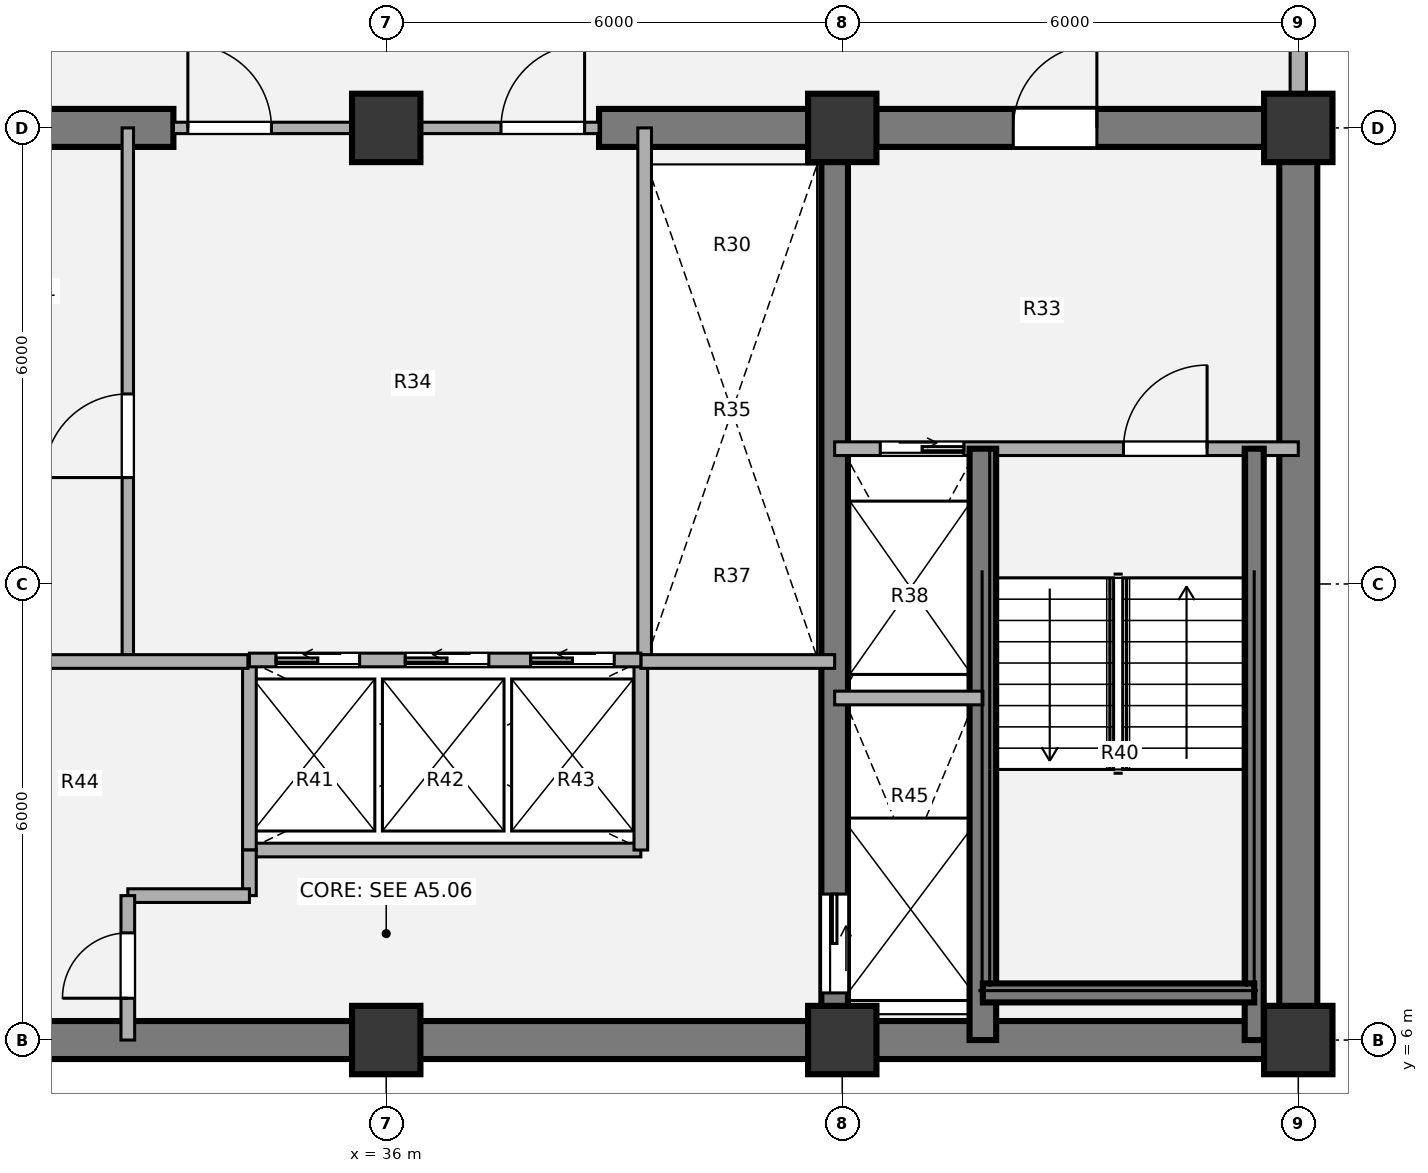
"""IFC4 building model, lengths in metres.
Left out: names, types, materials, properties, quantities, classifications, styles, units other than length and angle.
Written with IfcOpenShell. Run it as: python <this file> out.ifc"""

import sys

from ifc_helpers import new_model, si_unit, direction, frame, frame_2d, origin, origin_2d, place, context, subcontext, project, spatial, rectangle, extrude, source, transform, mapped, element, fill, save


model = new_model("IFC4")
c1 = context("Model", 3, precision=1e-05, world=origin(), true_north=direction((0.0, 1.0)))
c2 = subcontext(c1, "Body", "Model", "MODEL_VIEW")
j1 = project(units=[si_unit("LENGTHUNIT", "METRE"), si_unit("PLANEANGLEUNIT", "RADIAN")], contexts=[c1])
p1 = place(None, origin())
s1 = spatial("IfcSite", under=j1, at=p1, CompositionType="ELEMENT")
p2 = place(p1, origin())
s2 = spatial("IfcBuilding", under=s1, at=p2, CompositionType="ELEMENT")
p3 = place(p2, frame((0.0, 0.0, 127.62)))
s3 = spatial("IfcBuildingStorey", under=s2, at=p3, CompositionType="ELEMENT", Elevation=127.62)
m1 = source(origin(), c2, "Body", "SweptSolid", [
    extrude(rectangle(XDim=0.9, YDim=0.9, at=origin_2d()), origin(), (0.0, 0.0, 1.0), 3.78),
])
for number, where, z_axis, x_axis in (
    (1, (36.0, 6.0, 0.0), (0.0, 0.0, 1.0), (1.0, 0.0, 0.0)),
    (2, (42.0, 6.0, 0.0), (0.0, 0.0, 1.0), (1.0, 0.0, 0.0)),
    (3, (48.0, 6.0, 0.0), (0.0, 0.0, 1.0), (1.0, 0.0, 0.0)),
    (4, (36.0, 18.0, 0.0), (0.0, 0.0, 1.0), (1.0, 0.0, 0.0)),
    (5, (42.0, 18.0, 0.0), (0.0, 0.0, 1.0), (1.0, 0.0, 0.0)),
    (6, (48.0, 18.0, 0.0), (0.0, 0.0, 1.0), (1.0, 0.0, 0.0)),
):
    element("IfcColumn", number, at=place(p3, frame(where, z_axis=z_axis, x_axis=x_axis)), inside=s3, PredefinedType="COLUMN", context=c2, shape_type="MappedRepresentation", body=[
        mapped(m1, transform((0.0, 0.0, 0.0), x_axis=(1.0, 0.0, 0.0), y_axis=(0.0, 1.0, 0.0), z_axis=(0.0, 0.0, 1.0), scale=1.0)),
    ])
p4 = place(p3, frame((48.25, 6.0, 0.0), z_axis=(0.0, 0.0, 1.0), x_axis=(-1.0, 0.0, 0.0)))
e7 = element("IfcWall", 7, at=p4, inside=s3, PredefinedType="SHEAR", context=c2, shape_type="SweptSolid", body=[
    extrude(rectangle(XDim=24.5, YDim=0.5, at=frame_2d((12.25, 0.0))), origin(), (0.0, 0.0, 1.0), 3.78),
])
p5 = place(p3, frame((48.0, 18.0, 0.0), z_axis=(0.0, 0.0, 1.0), x_axis=(0.0, -1.0, 0.0)))
e8 = element("IfcWall", 8, at=p5, inside=s3, PredefinedType="SHEAR", context=c2, shape_type="SweptSolid", body=[
    extrude(rectangle(XDim=12.0, YDim=0.5, at=frame_2d((6.0, 0.0))), origin(), (0.0, 0.0, 1.0), 3.78),
])
p6 = place(p3, frame((23.75, 18.0, 0.0), z_axis=(0.0, 0.0, 1.0), x_axis=(1.0, 0.0, 0.0)))
e9 = element("IfcWall", 9, at=p6, inside=s3, PredefinedType="SHEAR", context=c2, shape_type="SweptSolid", body=[
    extrude(rectangle(XDim=9.45, YDim=0.5, at=frame_2d((4.725, 0.0))), origin(), (0.0, 0.0, 1.0), 3.78),
])
p7 = place(p6, frame((2.95, 0.0, 0.0)))
e10 = element("IfcOpeningElement", 10, at=p7, cuts=e9, PredefinedType="OPENING", context=c2, shape_type="SweptSolid", body=[
    extrude(rectangle(XDim=1.1, YDim=2.1, at=origin_2d()), frame((0.55, 0.26, 1.05), z_axis=(0.0, -1.0, 0.0), x_axis=(1.0, 0.0, 0.0)), (0.0, 0.0, 1.0), 0.52),
])
p8 = place(p3, frame((38.8, 18.0, 0.0), z_axis=(0.0, 0.0, 1.0), x_axis=(1.0, 0.0, 0.0)))
e11 = element("IfcWall", 11, at=p8, inside=s3, PredefinedType="SHEAR", context=c2, shape_type="SweptSolid", body=[
    extrude(rectangle(XDim=9.45, YDim=0.5, at=frame_2d((4.725, 0.0))), origin(), (0.0, 0.0, 1.0), 3.78),
])
p9 = place(p8, frame((5.45, 0.0, 0.0)))
e12 = element("IfcOpeningElement", 12, at=p9, cuts=e11, PredefinedType="OPENING", context=c2, shape_type="SweptSolid", body=[
    extrude(rectangle(XDim=1.1, YDim=2.1, at=origin_2d()), frame((0.55, 0.26, 1.05), z_axis=(0.0, -1.0, 0.0), x_axis=(1.0, 0.0, 0.0)), (0.0, 0.0, 1.0), 0.52),
])
p10 = place(p3, frame((41.9, 18.0, 0.0), z_axis=(0.0, 0.0, 1.0), x_axis=(0.0, -1.0, 0.0)))
e13 = element("IfcWall", 13, at=p10, inside=s3, PredefinedType="SHEAR", context=c2, shape_type="SweptSolid", body=[
    extrude(rectangle(XDim=12.0, YDim=0.35, at=frame_2d((6.0, 0.0))), origin(), (0.0, 0.0, 1.0), 3.78),
])
p11 = place(p10, frame((10.08, 0.0, 0.0)))
e14 = element("IfcOpeningElement", 14, at=p11, cuts=e13, PredefinedType="OPENING", context=c2, shape_type="SweptSolid", body=[
    extrude(rectangle(XDim=1.3, YDim=2.1, at=origin_2d()), frame((0.65, 0.185, 1.05), z_axis=(0.0, -1.0, 0.0), x_axis=(1.0, 0.0, 0.0)), (0.0, 0.0, 1.0), 0.37),
])
p12 = place(p3, frame((48.0, 21.05, 0.0), z_axis=(0.0, 0.0, 1.0), x_axis=(0.0, -1.0, 0.0)))
e15 = element("IfcWall", 15, at=p12, inside=s3, PredefinedType="SOLIDWALL", context=c2, shape_type="SweptSolid", body=[
    extrude(rectangle(XDim=2.62, YDim=0.215, at=frame_2d((1.31, 0.0))), origin(), (0.0, 0.0, 1.0), 3.53),
])
p13 = place(p3, frame((32.6, 11.0, 0.0), z_axis=(0.0, 0.0, 1.0), x_axis=(0.0, 1.0, 0.0)))
e16 = element("IfcWall", 16, at=p13, inside=s3, PredefinedType="PARTITIONING", context=c2, shape_type="SweptSolid", body=[
    extrude(rectangle(XDim=7.0, YDim=0.15, at=frame_2d((3.5, 0.0))), origin(), (0.0, 0.0, 1.0), 3.5),
])
p14 = place(p13, frame((2.4, 0.0, 0.0)))
e17 = element("IfcOpeningElement", 17, at=p14, cuts=e16, PredefinedType="OPENING", context=c2, shape_type="SweptSolid", body=[
    extrude(rectangle(XDim=1.1, YDim=2.1, at=origin_2d()), frame((0.55, 0.085, 1.05), z_axis=(0.0, -1.0, 0.0), x_axis=(1.0, 0.0, 0.0)), (0.0, 0.0, 1.0), 0.17),
])
p15 = place(p3, frame((34.2, 8.5, 0.0), z_axis=(0.0, 0.0, 1.0), x_axis=(1.0, 0.0, 0.0)))
e18 = element("IfcWall", 18, at=p15, inside=s3, PredefinedType="PARTITIONING", context=c2, shape_type="SweptSolid", body=[
    extrude(rectangle(XDim=5.15, YDim=0.18, at=frame_2d((2.575, 0.0))), origin(), (0.0, 0.0, 1.0), 3.5),
])
for number, where, z_axis, x_axis in (
    (19, (34.2, 8.5, 0.0), (0.0, 0.0, 1.0), (0.0, 1.0, 0.0)),
    (20, (39.35, 8.5, 0.0), (0.0, 0.0, 1.0), (0.0, 1.0, 0.0)),
):
    element("IfcWall", number, at=place(p3, frame(where, z_axis=z_axis, x_axis=x_axis)), inside=s3, PredefinedType="PARTITIONING", context=c2, shape_type="SweptSolid", body=[
        extrude(rectangle(XDim=2.5, YDim=0.18, at=frame_2d((1.25, 0.0))), origin(), (0.0, 0.0, 1.0), 3.5),
    ])
p16 = place(p3, frame((39.4, 11.0, 0.0), z_axis=(0.0, 0.0, 1.0), x_axis=(0.0, 1.0, 0.0)))
e21 = element("IfcWall", 21, at=p16, inside=s3, PredefinedType="PARTITIONING", context=c2, shape_type="SweptSolid", body=[
    extrude(rectangle(XDim=7.0, YDim=0.18, at=frame_2d((3.5, 0.0))), origin(), (0.0, 0.0, 1.0), 3.5),
])
p17 = place(p3, frame((30.1, 10.98, 0.0), z_axis=(0.0, 0.0, 1.0), x_axis=(1.0, 0.0, 0.0)))
e22 = element("IfcWall", 22, at=p17, inside=s3, PredefinedType="PARTITIONING", context=c2, shape_type="SweptSolid", body=[
    extrude(rectangle(XDim=4.08, YDim=0.18, at=frame_2d((2.04, 0.0))), origin(), (0.0, 0.0, 1.0), 3.5),
])
p18 = place(p3, frame((34.2, 7.9, 0.0), z_axis=(0.0, 0.0, 1.0), x_axis=(0.0, 1.0, 0.0)))
e23 = element("IfcWall", 23, at=p18, inside=s3, PredefinedType="PARTITIONING", context=c2, shape_type="SweptSolid", body=[
    extrude(rectangle(XDim=0.6, YDim=0.18, at=frame_2d((0.3, 0.0))), origin(), (0.0, 0.0, 1.0), 3.5),
])
p19 = place(p3, frame((32.6, 7.9, 0.0), z_axis=(0.0, 0.0, 1.0), x_axis=(1.0, 0.0, 0.0)))
e24 = element("IfcWall", 24, at=p19, inside=s3, PredefinedType="PARTITIONING", context=c2, shape_type="SweptSolid", body=[
    extrude(rectangle(XDim=1.6, YDim=0.18, at=frame_2d((0.8, 0.0))), origin(), (0.0, 0.0, 1.0), 3.5),
])
p20 = place(p3, frame((32.6, 6.0, 0.0), z_axis=(0.0, 0.0, 1.0), x_axis=(0.0, 1.0, 0.0)))
e25 = element("IfcWall", 25, at=p20, inside=s3, PredefinedType="PARTITIONING", context=c2, shape_type="SweptSolid", body=[
    extrude(rectangle(XDim=1.9, YDim=0.18, at=frame_2d((0.95, 0.0))), origin(), (0.0, 0.0, 1.0), 3.5),
])
p21 = place(p20, frame((0.55, 0.0, 0.0)))
e26 = element("IfcOpeningElement", 26, at=p21, cuts=e25, PredefinedType="OPENING", context=c2, shape_type="SweptSolid", body=[
    extrude(rectangle(XDim=0.86, YDim=2.1, at=origin_2d()), frame((0.43, 0.1, 1.05), z_axis=(0.0, -1.0, 0.0), x_axis=(1.0, 0.0, 0.0)), (0.0, 0.0, 1.0), 0.2),
])
p22 = place(p3, frame((39.35, 10.98, 0.0), z_axis=(0.0, 0.0, 1.0), x_axis=(1.0, 0.0, 0.0)))
e27 = element("IfcWall", 27, at=p22, inside=s3, PredefinedType="PARTITIONING", context=c2, shape_type="SweptSolid", body=[
    extrude(rectangle(XDim=2.55, YDim=0.18, at=frame_2d((1.275, 0.0))), origin(), (0.0, 0.0, 1.0), 3.5),
])
p23 = place(p3, frame((33.2, 18.0, 0.0), z_axis=(0.0, 0.0, 1.0), x_axis=(1.0, 0.0, 0.0)))
e28 = element("IfcWall", 28, at=p23, inside=s3, PredefinedType="PARTITIONING", context=c2, shape_type="SweptSolid", body=[
    extrude(rectangle(XDim=5.6, YDim=0.15, at=frame_2d((2.8, 0.0))), origin(), (0.0, 0.0, 1.0), 2.315),
])
p24 = place(p23, frame((0.19, 0.0, 0.0)))
e29 = element("IfcOpeningElement", 29, at=p24, cuts=e28, PredefinedType="OPENING", context=c2, shape_type="SweptSolid", body=[
    extrude(rectangle(XDim=1.1, YDim=2.1, at=origin_2d()), frame((0.55, 0.085, 1.05), z_axis=(0.0, -1.0, 0.0), x_axis=(1.0, 0.0, 0.0)), (0.0, 0.0, 1.0), 0.17),
])
p25 = place(p23, frame((4.31, 0.0, 0.0)))
e30 = element("IfcOpeningElement", 30, at=p25, cuts=e28, PredefinedType="OPENING", context=c2, shape_type="SweptSolid", body=[
    extrude(rectangle(XDim=1.1, YDim=2.1, at=origin_2d()), frame((0.55, 0.085, 1.05), z_axis=(0.0, -1.0, 0.0), x_axis=(1.0, 0.0, 0.0)), (0.0, 0.0, 1.0), 0.17),
])
p26 = place(p3, frame((41.9, 13.78, 0.0), z_axis=(0.0, 0.0, 1.0), x_axis=(1.0, 0.0, 0.0)))
e31 = element("IfcWall", 31, at=p26, inside=s3, PredefinedType="PARTITIONING", context=c2, shape_type="SweptSolid", body=[
    extrude(rectangle(XDim=6.1, YDim=0.18, at=frame_2d((3.05, 0.0))), origin(), (0.0, 0.0, 1.0), 3.5),
])
p27 = place(p26, frame((0.6, 0.0, 0.0)))
e32 = element("IfcOpeningElement", 32, at=p27, cuts=e31, PredefinedType="OPENING", context=c2, shape_type="SweptSolid", body=[
    extrude(rectangle(XDim=1.1, YDim=2.1, at=origin_2d()), frame((0.55, 0.1, 1.05), z_axis=(0.0, -1.0, 0.0), x_axis=(1.0, 0.0, 0.0)), (0.0, 0.0, 1.0), 0.2),
])
p28 = place(p26, frame((3.8, 0.0, 0.0)))
e33 = element("IfcOpeningElement", 33, at=p28, cuts=e31, PredefinedType="OPENING", context=c2, shape_type="SweptSolid", body=[
    extrude(rectangle(XDim=1.1, YDim=2.1, at=origin_2d()), frame((0.55, 0.1, 1.05), z_axis=(0.0, -1.0, 0.0), x_axis=(1.0, 0.0, 0.0)), (0.0, 0.0, 1.0), 0.2),
])
p29 = place(p3, frame((43.85, 6.0, 0.0), z_axis=(0.0, 0.0, 1.0), x_axis=(0.0, 1.0, 0.0)))
e34 = element("IfcWall", 34, at=p29, inside=s3, PredefinedType="SHEAR", context=c2, shape_type="SweptSolid", body=[
    extrude(rectangle(XDim=7.78, YDim=0.35, at=frame_2d((3.89, 0.0))), origin(), (0.0, 0.0, 1.0), 3.85),
])
p30 = place(p3, frame((47.42, 6.0, 0.0), z_axis=(0.0, 0.0, 1.0), x_axis=(0.0, 1.0, 0.0)))
e35 = element("IfcWall", 35, at=p30, inside=s3, PredefinedType="SHEAR", context=c2, shape_type="SweptSolid", body=[
    extrude(rectangle(XDim=7.78, YDim=0.25, at=frame_2d((3.89, 0.0))), origin(), (0.0, 0.0, 1.0), 3.85),
])
p31 = place(p3, frame((43.85, 6.62, 0.0), z_axis=(0.0, 0.0, 1.0), x_axis=(1.0, 0.0, 0.0)))
e36 = element("IfcWall", 36, at=p31, inside=s3, PredefinedType="SHEAR", context=c2, shape_type="SweptSolid", body=[
    extrude(rectangle(XDim=3.57, YDim=0.25, at=frame_2d((1.785, 0.0))), origin(), (0.0, 0.0, 1.0), 3.85),
])
p32 = place(p3, frame((41.9, 10.5, 0.0), z_axis=(0.0, 0.0, 1.0), x_axis=(1.0, 0.0, 0.0)))
e37 = element("IfcWall", 37, at=p32, inside=s3, PredefinedType="PARTITIONING", context=c2, shape_type="SweptSolid", body=[
    extrude(rectangle(XDim=1.95, YDim=0.18, at=frame_2d((0.975, 0.0))), origin(), (0.0, 0.0, 1.0), 3.5),
])
p33 = place(p3, frame((34.2, 11.0, 0.0), z_axis=(0.0, 0.0, 1.0), x_axis=(1.0, 0.0, 0.0)))
e38 = element("IfcWall", 38, at=p33, inside=s3, PredefinedType="PARTITIONING", context=c2, shape_type="SweptSolid", body=[
    extrude(rectangle(XDim=5.15, YDim=0.18, at=frame_2d((2.575, 0.0))), origin(), (0.0, 0.0, 1.0), 3.5),
])
p34 = place(p33, frame((0.35, 0.0, 0.0)))
e39 = element("IfcOpeningElement", 39, at=p34, cuts=e38, PredefinedType="OPENING", context=c2, shape_type="SweptSolid", body=[
    extrude(rectangle(XDim=1.1, YDim=2.1, at=origin_2d()), frame((0.55, 0.1, 1.05), z_axis=(0.0, -1.0, 0.0), x_axis=(1.0, 0.0, 0.0)), (0.0, 0.0, 1.0), 0.2),
])
p35 = place(p33, frame((2.05, 0.0, 0.0)))
e40 = element("IfcOpeningElement", 40, at=p35, cuts=e38, PredefinedType="OPENING", context=c2, shape_type="SweptSolid", body=[
    extrude(rectangle(XDim=1.1, YDim=2.1, at=origin_2d()), frame((0.55, 0.1, 1.05), z_axis=(0.0, -1.0, 0.0), x_axis=(1.0, 0.0, 0.0)), (0.0, 0.0, 1.0), 0.2),
])
p36 = place(p33, frame((3.7, 0.0, 0.0)))
e41 = element("IfcOpeningElement", 41, at=p36, cuts=e38, PredefinedType="OPENING", context=c2, shape_type="SweptSolid", body=[
    extrude(rectangle(XDim=1.1, YDim=2.1, at=origin_2d()), frame((0.55, 0.1, 1.05), z_axis=(0.0, -1.0, 0.0), x_axis=(1.0, 0.0, 0.0)), (0.0, 0.0, 1.0), 0.2),
])
m2 = source(origin(), c2, "Body", "SweptSolid", [
    extrude(rectangle(XDim=1.1, YDim=2.1, at=origin_2d()), frame((0.55, 0.025, 1.05), z_axis=(0.0, -1.0, 0.0), x_axis=(1.0, 0.0, 0.0)), (0.0, 0.0, 1.0), 0.05),
])
p37 = place(p14, origin())
e42 = element("IfcDoor", 42, at=p37, inside=s3, OperationType="SINGLE_SWING_LEFT", PredefinedType="DOOR", context=c2, shape_type="MappedRepresentation", body=[
    mapped(m2, transform((0.0, 0.0, 0.0), x_axis=(1.0, 0.0, 0.0), y_axis=(0.0, 1.0, 0.0), z_axis=(0.0, 0.0, 1.0), scale=1.0)),
])
fill(e17, e42)
m3 = source(origin(), c2, "Body", "SweptSolid", [
    extrude(rectangle(XDim=0.86, YDim=2.1, at=origin_2d()), frame((0.43, 0.025, 1.05), z_axis=(0.0, -1.0, 0.0), x_axis=(1.0, 0.0, 0.0)), (0.0, 0.0, 1.0), 0.05),
])
p38 = place(p21, origin())
e43 = element("IfcDoor", 43, at=p38, inside=s3, OperationType="SINGLE_SWING_LEFT", PredefinedType="DOOR", context=c2, shape_type="MappedRepresentation", body=[
    mapped(m3, transform((0.0, 0.0, 0.0), x_axis=(1.0, 0.0, 0.0), y_axis=(0.0, 1.0, 0.0), z_axis=(0.0, 0.0, 1.0), scale=1.0)),
])
fill(e26, e43)
m4 = source(origin(), c2, "Body", "SweptSolid", [
    extrude(rectangle(XDim=1.1, YDim=2.1, at=origin_2d()), frame((0.55, 0.025, 1.05), z_axis=(0.0, -1.0, 0.0), x_axis=(1.0, 0.0, 0.0)), (0.0, 0.0, 1.0), 0.05),
])
p39 = place(p24, origin())
e44 = element("IfcDoor", 44, at=p39, inside=s3, OperationType="SINGLE_SWING_LEFT", PredefinedType="DOOR", context=c2, shape_type="MappedRepresentation", body=[
    mapped(m4, transform((0.0, 0.0, 0.0), x_axis=(1.0, 0.0, 0.0), y_axis=(0.0, 1.0, 0.0), z_axis=(0.0, 0.0, 1.0), scale=1.0)),
])
fill(e29, e44)
p40 = place(p25, origin())
e45 = element("IfcDoor", 45, at=p40, inside=s3, OperationType="SINGLE_SWING_RIGHT", PredefinedType="DOOR", context=c2, shape_type="MappedRepresentation", body=[
    mapped(m4, transform((0.0, 0.0, 0.0), x_axis=(1.0, 0.0, 0.0), y_axis=(0.0, 1.0, 0.0), z_axis=(0.0, 0.0, 1.0), scale=1.0)),
])
fill(e30, e45)
m5 = source(origin(), c2, "Body", "SweptSolid", [
    extrude(rectangle(XDim=1.1, YDim=2.1, at=origin_2d()), frame((0.55, 0.025, 1.05), z_axis=(0.0, -1.0, 0.0), x_axis=(1.0, 0.0, 0.0)), (0.0, 0.0, 1.0), 0.05),
])
p41 = place(p27, origin())
e46 = element("IfcDoor", 46, at=p41, inside=s3, OperationType="SLIDING_TO_RIGHT", PredefinedType="DOOR", context=c2, shape_type="MappedRepresentation", body=[
    mapped(m5, transform((0.0, 0.0, 0.0), x_axis=(1.0, 0.0, 0.0), y_axis=(0.0, 1.0, 0.0), z_axis=(0.0, 0.0, 1.0), scale=1.0)),
])
fill(e32, e46)
m6 = source(origin(), c2, "Body", "SweptSolid", [
    extrude(rectangle(XDim=1.1, YDim=2.1, at=origin_2d()), frame((0.55, 0.025, 1.05), z_axis=(0.0, -1.0, 0.0), x_axis=(1.0, 0.0, 0.0)), (0.0, 0.0, 1.0), 0.05),
])
p42 = place(p28, origin())
e47 = element("IfcDoor", 47, at=p42, inside=s3, OperationType="SINGLE_SWING_RIGHT", PredefinedType="DOOR", context=c2, shape_type="MappedRepresentation", body=[
    mapped(m6, transform((0.0, 0.0, 0.0), x_axis=(1.0, 0.0, 0.0), y_axis=(0.0, 1.0, 0.0), z_axis=(0.0, 0.0, 1.0), scale=1.0)),
])
fill(e33, e47)
m7 = source(origin(), c2, "Body", "SweptSolid", [
    extrude(rectangle(XDim=1.3, YDim=2.1, at=origin_2d()), frame((0.65, 0.025, 1.05), z_axis=(0.0, -1.0, 0.0), x_axis=(1.0, 0.0, 0.0)), (0.0, 0.0, 1.0), 0.05),
])
p43 = place(p11, origin())
e48 = element("IfcDoor", 48, at=p43, inside=s3, OperationType="SLIDING_TO_LEFT", PredefinedType="DOOR", context=c2, shape_type="MappedRepresentation", body=[
    mapped(m7, transform((0.0, 0.0, 0.0), x_axis=(1.0, 0.0, 0.0), y_axis=(0.0, 1.0, 0.0), z_axis=(0.0, 0.0, 1.0), scale=1.0)),
])
fill(e14, e48)
p44 = place(p9, origin())
e49 = element("IfcDoor", 49, at=p44, inside=s3, OperationType="SINGLE_SWING_RIGHT", PredefinedType="DOOR", context=c2, shape_type="MappedRepresentation", body=[
    mapped(m4, transform((0.0, 0.0, 0.0), x_axis=(1.0, 0.0, 0.0), y_axis=(0.0, 1.0, 0.0), z_axis=(0.0, 0.0, 1.0), scale=1.0)),
])
fill(e12, e49)
p45 = place(p34, origin())
e50 = element("IfcDoor", 50, at=p45, inside=s3, OperationType="SLIDING_TO_LEFT", PredefinedType="DOOR", context=c2, shape_type="MappedRepresentation", body=[
    mapped(m5, transform((0.0, 0.0, 0.0), x_axis=(1.0, 0.0, 0.0), y_axis=(0.0, 1.0, 0.0), z_axis=(0.0, 0.0, 1.0), scale=1.0)),
])
fill(e39, e50)
p46 = place(p35, origin())
e51 = element("IfcDoor", 51, at=p46, inside=s3, OperationType="SLIDING_TO_LEFT", PredefinedType="DOOR", context=c2, shape_type="MappedRepresentation", body=[
    mapped(m5, transform((0.0, 0.0, 0.0), x_axis=(1.0, 0.0, 0.0), y_axis=(0.0, 1.0, 0.0), z_axis=(0.0, 0.0, 1.0), scale=1.0)),
])
fill(e40, e51)
p47 = place(p36, origin())
e52 = element("IfcDoor", 52, at=p47, inside=s3, OperationType="SLIDING_TO_LEFT", PredefinedType="DOOR", context=c2, shape_type="MappedRepresentation", body=[
    mapped(m5, transform((0.0, 0.0, 0.0), x_axis=(1.0, 0.0, 0.0), y_axis=(0.0, 1.0, 0.0), z_axis=(0.0, 0.0, 1.0), scale=1.0)),
])
fill(e41, e52)
save(model, sys.argv[1])
